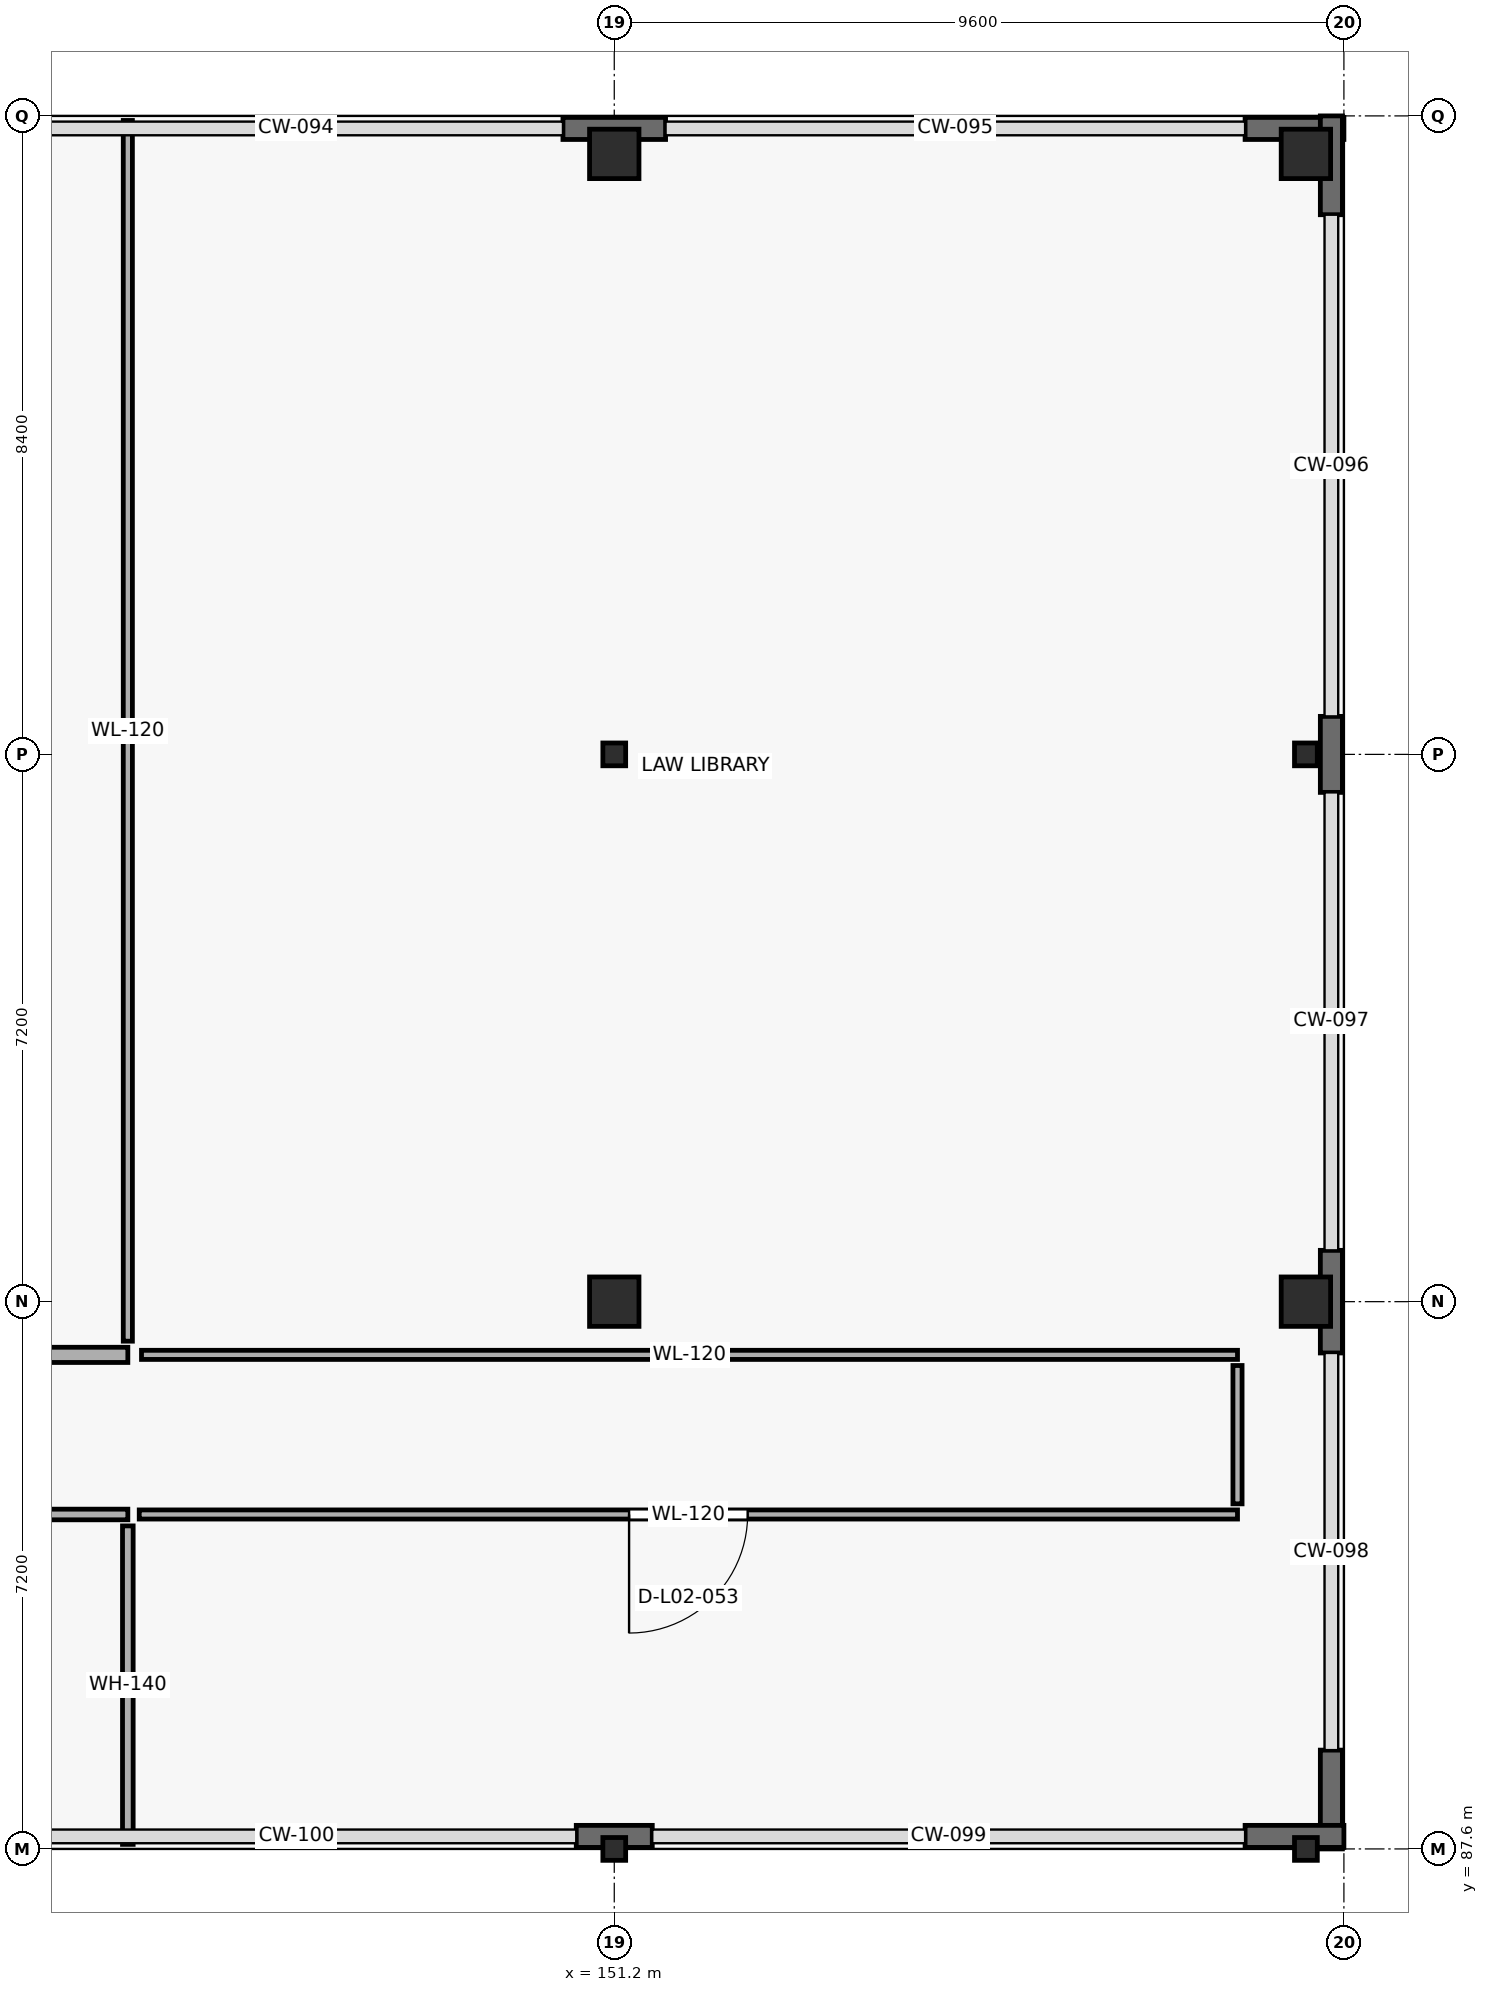
"""IFC4 building model, lengths in metres.
Left out: names, types, materials, properties, quantities, classifications, styles, units other than length and angle.
Written with IfcOpenShell. Run it as: python <this file> out.ifc"""

import sys

from ifc_helpers import new_model, si_unit, direction, frame, frame_2d, origin, origin_2d, place, context, subcontext, project, spatial, rectangle, hollow_rectangle, extrude, element, fill, save


model = new_model("IFC4")
c1 = context("Model", 3, precision=1e-05, world=origin(), true_north=direction((0.0, 1.0)))
c2 = subcontext(c1, "Body", "Model", "MODEL_VIEW")
j1 = project(units=[si_unit("LENGTHUNIT", "METRE"), si_unit("PLANEANGLEUNIT", "RADIAN")], contexts=[c1])
p1 = place(None, origin())
s1 = spatial("IfcSite", under=j1, at=p1, CompositionType="ELEMENT")
p2 = place(p1, origin())
s2 = spatial("IfcBuilding", under=s1, at=p2, CompositionType="ELEMENT")
p3 = place(p2, frame((0.0, 0.0, 5.4)))
s3 = spatial("IfcBuildingStorey", under=s2, at=p3, CompositionType="ELEMENT", Elevation=5.4)
p4 = place(p3, frame((151.2, 87.6, 0.0), z_axis=(0.0, 0.0, 1.0), x_axis=(1.0, 0.0, 0.0)))
e1 = element("IfcColumn", 1, at=p4, inside=s3, PredefinedType="COLUMN", context=c2, shape_type="SweptSolid", body=[
    extrude(hollow_rectangle(XDim=0.3, YDim=0.3, WallThickness=0.012, at=origin_2d()), origin(), (0.0, 0.0, 1.0), 4.8),
])
p5 = place(p3, frame((151.2, 94.8, 0.0), z_axis=(0.0, 0.0, 1.0), x_axis=(1.0, 0.0, 0.0)))
e2 = element("IfcColumn", 2, at=p5, inside=s3, PredefinedType="COLUMN", context=c2, shape_type="SweptSolid", body=[
    extrude(rectangle(XDim=0.65, YDim=0.65, at=origin_2d()), origin(), (0.0, 0.0, 1.0), 4.8),
])
p6 = place(p3, frame((151.2, 102.0, 0.0), z_axis=(0.0, 0.0, 1.0), x_axis=(1.0, 0.0, 0.0)))
e3 = element("IfcColumn", 3, at=p6, inside=s3, PredefinedType="COLUMN", context=c2, shape_type="SweptSolid", body=[
    extrude(hollow_rectangle(XDim=0.3, YDim=0.3, WallThickness=0.012, at=origin_2d()), origin(), (0.0, 0.0, 1.0), 4.8),
])
p7 = place(p3, frame((151.2, 109.9, 0.0), z_axis=(0.0, 0.0, 1.0), x_axis=(1.0, 0.0, 0.0)))
e4 = element("IfcColumn", 4, at=p7, inside=s3, PredefinedType="COLUMN", context=c2, shape_type="SweptSolid", body=[
    extrude(rectangle(XDim=0.65, YDim=0.65, at=origin_2d()), origin(), (0.0, 0.0, 1.0), 4.8),
])
p8 = place(p3, frame((160.3, 87.6, 0.0), z_axis=(0.0, 0.0, 1.0), x_axis=(1.0, 0.0, 0.0)))
e5 = element("IfcColumn", 5, at=p8, inside=s3, PredefinedType="COLUMN", context=c2, shape_type="SweptSolid", body=[
    extrude(hollow_rectangle(XDim=0.3, YDim=0.3, WallThickness=0.012, at=origin_2d()), origin(), (0.0, 0.0, 1.0), 4.8),
])
p9 = place(p3, frame((160.3, 94.8, 0.0), z_axis=(0.0, 0.0, 1.0), x_axis=(1.0, 0.0, 0.0)))
e6 = element("IfcColumn", 6, at=p9, inside=s3, PredefinedType="COLUMN", context=c2, shape_type="SweptSolid", body=[
    extrude(rectangle(XDim=0.65, YDim=0.65, at=origin_2d()), origin(), (0.0, 0.0, 1.0), 4.8),
])
p10 = place(p3, frame((160.3, 102.0, 0.0), z_axis=(0.0, 0.0, 1.0), x_axis=(1.0, 0.0, 0.0)))
e7 = element("IfcColumn", 7, at=p10, inside=s3, PredefinedType="COLUMN", context=c2, shape_type="SweptSolid", body=[
    extrude(hollow_rectangle(XDim=0.3, YDim=0.3, WallThickness=0.012, at=origin_2d()), origin(), (0.0, 0.0, 1.0), 4.8),
])
p11 = place(p3, frame((160.3, 109.9, 0.0), z_axis=(0.0, 0.0, 1.0), x_axis=(1.0, 0.0, 0.0)))
e8 = element("IfcColumn", 8, at=p11, inside=s3, PredefinedType="COLUMN", context=c2, shape_type="SweptSolid", body=[
    extrude(rectangle(XDim=0.65, YDim=0.65, at=origin_2d()), origin(), (0.0, 0.0, 1.0), 4.8),
])
p12 = place(p3, frame((150.525, 110.235, 0.0), z_axis=(0.0, 0.0, 1.0), x_axis=(1.0, 0.0, 0.0)))
e9 = element("IfcWall", 9, at=p12, inside=s3, PredefinedType="SOLIDWALL", context=c2, shape_type="SweptSolid", body=[
    extrude(rectangle(XDim=1.35, YDim=0.29, at=frame_2d((0.675, 0.0))), origin(), (0.0, 0.0, 1.0), 4.52),
])
p13 = place(p3, frame((159.5, 110.235, 0.0), z_axis=(0.0, 0.0, 1.0), x_axis=(1.0, 0.0, 0.0)))
e10 = element("IfcWall", 10, at=p13, inside=s3, PredefinedType="SOLIDWALL", context=c2, shape_type="SweptSolid", body=[
    extrude(rectangle(XDim=1.3, YDim=0.29, at=frame_2d((0.65, 0.0))), origin(), (0.0, 0.0, 1.0), 4.52),
])
p14 = place(p3, frame((160.635, 110.4, 0.0), z_axis=(0.0, 0.0, 1.0), x_axis=(0.0, -1.0, 0.0)))
e11 = element("IfcWall", 11, at=p14, inside=s3, PredefinedType="SOLIDWALL", context=c2, shape_type="SweptSolid", body=[
    extrude(rectangle(XDim=1.3, YDim=0.29, at=frame_2d((0.65, 0.0))), origin(), (0.0, 0.0, 1.0), 4.56),
])
p15 = place(p3, frame((160.635, 102.5, 0.0), z_axis=(0.0, 0.0, 1.0), x_axis=(0.0, -1.0, 0.0)))
e12 = element("IfcWall", 12, at=p15, inside=s3, PredefinedType="SOLIDWALL", context=c2, shape_type="SweptSolid", body=[
    extrude(rectangle(XDim=1.0, YDim=0.29, at=frame_2d((0.5, 0.0))), origin(), (0.0, 0.0, 1.0), 4.56),
])
p16 = place(p3, frame((160.635, 95.475, 0.0), z_axis=(0.0, 0.0, 1.0), x_axis=(0.0, -1.0, 0.0)))
e13 = element("IfcWall", 13, at=p16, inside=s3, PredefinedType="SOLIDWALL", context=c2, shape_type="SweptSolid", body=[
    extrude(rectangle(XDim=1.35, YDim=0.29, at=frame_2d((0.675, 0.0))), origin(), (0.0, 0.0, 1.0), 4.56),
])
p17 = place(p3, frame((160.635, 88.9, 0.0), z_axis=(0.0, 0.0, 1.0), x_axis=(0.0, -1.0, 0.0)))
e14 = element("IfcWall", 14, at=p17, inside=s3, PredefinedType="SOLIDWALL", context=c2, shape_type="SweptSolid", body=[
    extrude(rectangle(XDim=1.3, YDim=0.29, at=frame_2d((0.65, 0.0))), origin(), (0.0, 0.0, 1.0), 4.56),
])
p18 = place(p3, frame((160.8, 87.765, 0.0), z_axis=(0.0, 0.0, 1.0), x_axis=(-1.0, 0.0, 0.0)))
e15 = element("IfcWall", 15, at=p18, inside=s3, PredefinedType="SOLIDWALL", context=c2, shape_type="SweptSolid", body=[
    extrude(rectangle(XDim=1.3, YDim=0.29, at=frame_2d((0.65, 0.0))), origin(), (0.0, 0.0, 1.0), 4.52),
])
p19 = place(p3, frame((151.7, 87.765, 0.0), z_axis=(0.0, 0.0, 1.0), x_axis=(-1.0, 0.0, 0.0)))
e16 = element("IfcWall", 16, at=p19, inside=s3, PredefinedType="SOLIDWALL", context=c2, shape_type="SweptSolid", body=[
    extrude(rectangle(XDim=1.0, YDim=0.29, at=frame_2d((0.5, 0.0))), origin(), (0.0, 0.0, 1.0), 4.52),
])
p20 = place(p3, frame((124.8, 92.0, 0.0), z_axis=(0.0, 0.0, 1.0), x_axis=(1.0, 0.0, 0.0)))
e17 = element("IfcWall", 17, at=p20, inside=s3, PredefinedType="PARTITIONING", context=c2, shape_type="SweptSolid", body=[
    extrude(rectangle(XDim=20.0, YDim=0.14, at=frame_2d((10.0, 0.0))), origin(), (0.0, 0.0, 1.0), 4.52),
])
p21 = place(p20, frame((9.53, 0.0, 0.0)))
e18 = element("IfcOpeningElement", 18, at=p21, cuts=e17, PredefinedType="OPENING", context=c2, shape_type="SweptSolid", body=[
    extrude(rectangle(XDim=0.94, YDim=2.18, at=frame_2d((0.47, 1.09))), frame((0.0, 0.08, 0.0), z_axis=(0.0, -1.0, 0.0), x_axis=(1.0, 0.0, 0.0)), (0.0, 0.0, 1.0), 0.16),
])
p22 = place(p3, frame((144.8, 94.1, 0.0), z_axis=(0.0, 0.0, 1.0), x_axis=(-1.0, 0.0, 0.0)))
e19 = element("IfcWall", 19, at=p22, inside=s3, PredefinedType="PARTITIONING", context=c2, shape_type="SweptSolid", body=[
    extrude(rectangle(XDim=20.0, YDim=0.2, at=frame_2d((10.0, 0.0))), origin(), (0.0, 0.0, 1.0), 4.52),
])
p23 = place(p22, frame((7.04, 0.0, 0.0)))
e20 = element("IfcOpeningElement", 20, at=p23, cuts=e19, PredefinedType="OPENING", context=c2, shape_type="SweptSolid", body=[
    extrude(rectangle(XDim=1.12, YDim=2.15, at=frame_2d((0.56, 1.075))), frame((0.0, 0.11, 0.0), z_axis=(0.0, -1.0, 0.0), x_axis=(1.0, 0.0, 0.0)), (0.0, 0.0, 1.0), 0.22),
])
p24 = place(p3, frame((144.8, 94.28, 0.0), z_axis=(0.0, 0.0, 1.0), x_axis=(0.0, 1.0, 0.0)))
e21 = element("IfcWall", 21, at=p24, inside=s3, PredefinedType="PARTITIONING", context=c2, shape_type="SweptSolid", body=[
    extrude(rectangle(XDim=16.06, YDim=0.12, at=frame_2d((8.03, 0.0))), origin(), (0.0, 0.0, 1.0), 4.52),
])
p25 = place(p3, frame((144.95, 92.0, 0.0), z_axis=(0.0, 0.0, 1.0), x_axis=(1.0, 0.0, 0.0)))
e22 = element("IfcWall", 22, at=p25, inside=s3, PredefinedType="PARTITIONING", context=c2, shape_type="SweptSolid", body=[
    extrude(rectangle(XDim=14.45, YDim=0.12, at=frame_2d((7.225, 0.0))), origin(), (0.0, 0.0, 1.0), 4.52),
])
p26 = place(p25, frame((6.445, 0.0, 0.0)))
e23 = element("IfcOpeningElement", 23, at=p26, cuts=e22, PredefinedType="OPENING", context=c2, shape_type="SweptSolid", body=[
    extrude(rectangle(XDim=1.56, YDim=2.44, at=frame_2d((0.78, 1.22))), frame((0.0, 0.07, 0.0), z_axis=(0.0, -1.0, 0.0), x_axis=(1.0, 0.0, 0.0)), (0.0, 0.0, 1.0), 0.14),
])
p27 = place(p3, frame((159.4, 94.1, 0.0), z_axis=(0.0, 0.0, 1.0), x_axis=(-1.0, 0.0, 0.0)))
e24 = element("IfcWall", 24, at=p27, inside=s3, PredefinedType="PARTITIONING", context=c2, shape_type="SweptSolid", body=[
    extrude(rectangle(XDim=14.42, YDim=0.12, at=frame_2d((7.21, 0.0))), origin(), (0.0, 0.0, 1.0), 4.52),
])
p28 = place(p3, frame((144.8, 91.85, 0.0), z_axis=(0.0, 0.0, 1.0), x_axis=(0.0, -1.0, 0.0)))
e25 = element("IfcWall", 25, at=p28, inside=s3, PredefinedType="PARTITIONING", context=c2, shape_type="SweptSolid", body=[
    extrude(rectangle(XDim=4.19, YDim=0.14, at=frame_2d((2.095, 0.0))), origin(), (0.0, 0.0, 1.0), 4.52),
])
p29 = place(p3, frame((159.4, 92.14, 0.0), z_axis=(0.0, 0.0, 1.0), x_axis=(0.0, 1.0, 0.0)))
e26 = element("IfcWall", 26, at=p29, inside=s3, PredefinedType="PARTITIONING", context=c2, shape_type="SweptSolid", body=[
    extrude(rectangle(XDim=1.82, YDim=0.12, at=frame_2d((0.91, 0.0))), origin(), (0.0, 0.0, 1.0), 4.52),
])
p30 = place(p26, origin())
e27 = element("IfcDoor", 27, at=p30, inside=s3, OperationType="SINGLE_SWING_RIGHT", PredefinedType="DOOR", context=c2, shape_type="SweptSolid", body=[
    extrude(rectangle(XDim=1.56, YDim=2.44, at=frame_2d((0.78, 1.22))), frame((0.0, 0.025, 0.0), z_axis=(0.0, -1.0, 0.0), x_axis=(1.0, 0.0, 0.0)), (0.0, 0.0, 1.0), 0.05),
])
fill(e23, e27)
save(model, sys.argv[1])
